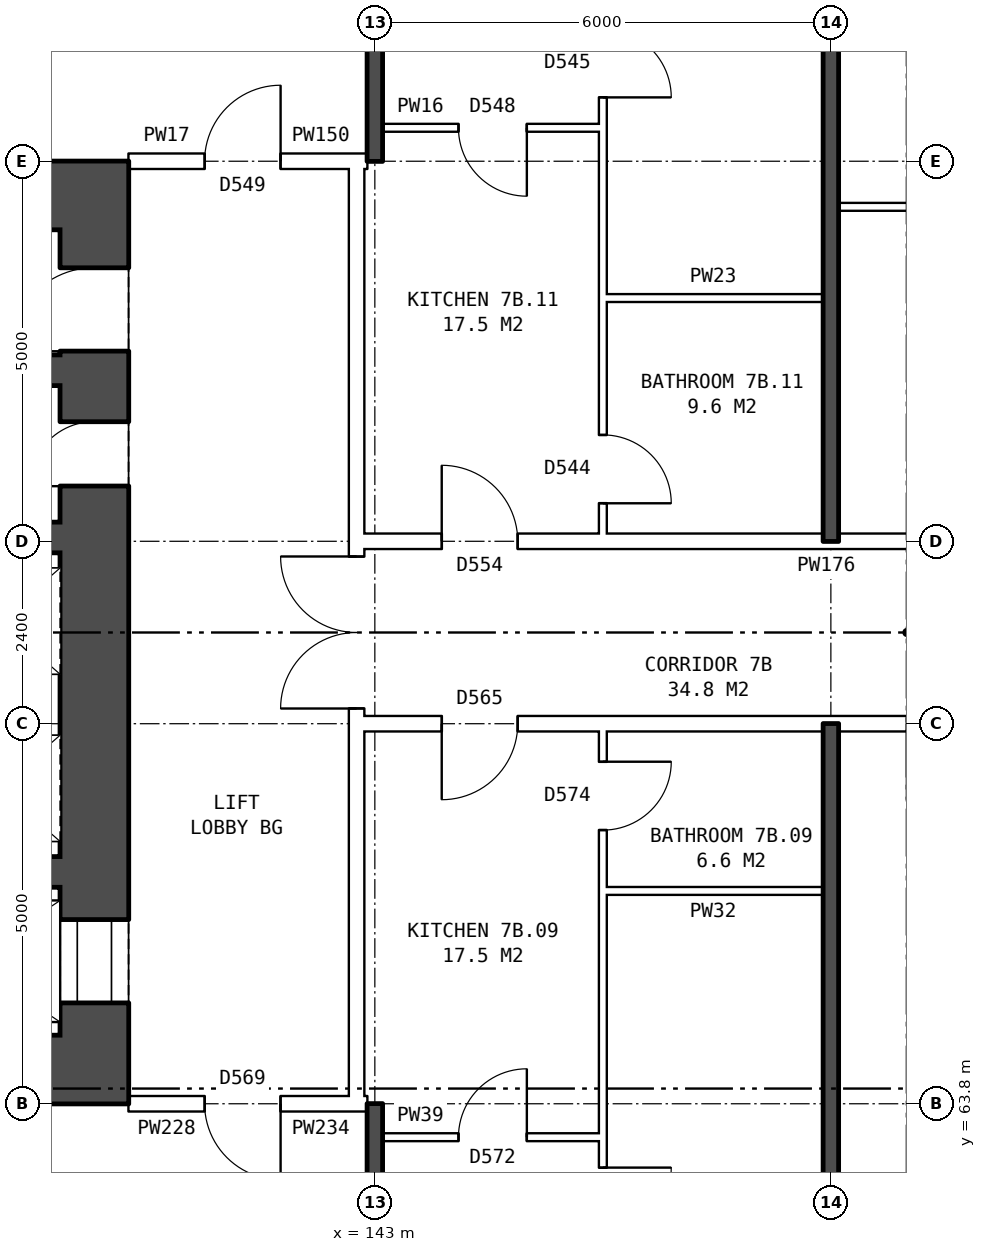
"""IFC4 building model, lengths in metres.
Left out: names, types, materials, properties, quantities, classifications, styles, units other than length and angle.
Written with IfcOpenShell. Run it as: python <this file> out.ifc"""

import sys

from ifc_helpers import new_model, si_unit, direction, frame, frame_2d, origin, place, context, subcontext, project, spatial, rectangle, extrude, element, fill, save


model = new_model("IFC4")
c1 = context("Model", 3, precision=1e-05, world=origin(), true_north=direction((0.0, 1.0)))
c2 = subcontext(c1, "Body", "Model", "MODEL_VIEW")
j1 = project(units=[si_unit("LENGTHUNIT", "METRE"), si_unit("PLANEANGLEUNIT", "RADIAN")], contexts=[c1])
p1 = place(None, origin())
s1 = spatial("IfcSite", under=j1, at=p1, CompositionType="ELEMENT")
p2 = place(p1, origin())
s2 = spatial("IfcBuilding", under=s1, at=p2, CompositionType="ELEMENT")
p3 = place(p2, frame((0.0, 0.0, 28.8)))
s3 = spatial("IfcBuildingStorey", under=s2, at=p3, CompositionType="ELEMENT", Elevation=28.8)
p4 = place(p3, frame((139.31, 64.7, 0.0), z_axis=(0.0, 0.0, 1.0), x_axis=(0.0, 1.0, 0.0)))
e1 = element("IfcWall", 1, at=p4, inside=s3, PredefinedType="SHEAR", context=c2, shape_type="SweptSolid", body=[
    extrude(rectangle(XDim=10.6, YDim=0.9, at=frame_2d((5.3, 0.0))), origin(), (0.0, 0.0, 1.0), 2.85),
])
p5 = place(p4, frame((0.425, 0.0, 0.0)))
e2 = element("IfcOpeningElement", 2, at=p5, cuts=e1, PredefinedType="OPENING", context=c2, shape_type="SweptSolid", body=[
    extrude(rectangle(XDim=1.1, YDim=2.1, at=frame_2d((0.55, 1.05))), frame((0.0, 0.46, 0.0), z_axis=(0.0, -1.0, 0.0), x_axis=(1.0, 0.0, 0.0)), (0.0, 0.0, 1.0), 0.92),
])
p6 = place(p4, frame((9.0, 0.0, 0.0)))
e3 = element("IfcOpeningElement", 3, at=p6, cuts=e1, PredefinedType="OPENING", context=c2, shape_type="SweptSolid", body=[
    extrude(rectangle(XDim=1.1, YDim=2.1, at=frame_2d((0.55, 1.05))), frame((0.0, 0.46, 0.0), z_axis=(0.0, -1.0, 0.0), x_axis=(1.0, 0.0, 0.0)), (0.0, 0.0, 1.0), 0.92),
])
p7 = place(p4, frame((7.225, 0.0, 0.0)))
e4 = element("IfcOpeningElement", 4, at=p7, cuts=e1, PredefinedType="OPENING", context=c2, shape_type="SweptSolid", body=[
    extrude(rectangle(XDim=0.85, YDim=2.1, at=frame_2d((0.425, 1.05))), frame((0.0, 0.46, 0.0), z_axis=(0.0, -1.0, 0.0), x_axis=(1.0, 0.0, 0.0)), (0.0, 0.0, 1.0), 0.92),
])
for number, where, z_axis, x_axis in (
    (5, (139.76, 64.25, 0.0), (0.0, 0.0, 1.0), (-1.0, 0.0, 0.0)),
    (6, (139.76, 75.75, 0.0), (0.0, 0.0, 1.0), (-1.0, 0.0, 0.0)),
):
    element("IfcWall", number, at=place(p3, frame(where, z_axis=z_axis, x_axis=x_axis)), inside=s3, PredefinedType="SHEAR", context=c2, shape_type="SweptSolid", body=[
        extrude(rectangle(XDim=8.4, YDim=0.9, at=frame_2d((4.2, 0.0))), origin(), (0.0, 0.0, 1.0), 2.85),
    ])
p8 = place(p3, frame((138.86, 66.85, 0.0), z_axis=(0.0, 0.0, 1.0), x_axis=(-1.0, 0.0, 0.0)))
e7 = element("IfcWall", 7, at=p8, inside=s3, PredefinedType="SHEAR", context=c2, shape_type="SweptSolid", body=[
    extrude(rectangle(XDim=3.7, YDim=0.4, at=frame_2d((1.85, 0.0))), origin(), (0.0, 0.0, 1.0), 2.85),
])
p9 = place(p3, frame((138.86, 71.25, 0.0), z_axis=(0.0, 0.0, 1.0), x_axis=(-1.0, 0.0, 0.0)))
e8 = element("IfcWall", 8, at=p9, inside=s3, PredefinedType="SHEAR", context=c2, shape_type="SweptSolid", body=[
    extrude(rectangle(XDim=6.6, YDim=0.4, at=frame_2d((3.3, 0.0))), origin(), (0.0, 0.0, 1.0), 2.85),
])
p10 = place(p9, frame((4.25, 0.0, 0.0)))
e9 = element("IfcOpeningElement", 9, at=p10, cuts=e8, PredefinedType="OPENING", context=c2, shape_type="SweptSolid", body=[
    extrude(rectangle(XDim=1.1, YDim=2.1, at=frame_2d((0.55, 1.05))), frame((0.0, 0.21, 0.0), z_axis=(0.0, -1.0, 0.0), x_axis=(1.0, 0.0, 0.0)), (0.0, 0.0, 1.0), 0.42),
])
p11 = place(p9, frame((2.6, 0.0, 0.0)))
e10 = element("IfcOpeningElement", 10, at=p11, cuts=e8, PredefinedType="OPENING", context=c2, shape_type="SweptSolid", body=[
    extrude(rectangle(XDim=0.85, YDim=2.1, at=frame_2d((0.425, 1.05))), frame((0.0, 0.21, 0.0), z_axis=(0.0, -1.0, 0.0), x_axis=(1.0, 0.0, 0.0)), (0.0, 0.0, 1.0), 0.42),
])
p12 = place(p3, frame((138.86, 73.45, 0.0), z_axis=(0.0, 0.0, 1.0), x_axis=(-1.0, 0.0, 0.0)))
e11 = element("IfcWall", 11, at=p12, inside=s3, PredefinedType="SHEAR", context=c2, shape_type="SweptSolid", body=[
    extrude(rectangle(XDim=1.95, YDim=0.4, at=frame_2d((0.975, 0.0))), origin(), (0.0, 0.0, 1.0), 2.85),
])
p13 = place(p3, frame((142.76, 63.9, 0.0), z_axis=(0.0, 0.0, 1.0), x_axis=(0.0, 1.0, 0.0)))
e12 = element("IfcWall", 12, at=p13, inside=s3, PredefinedType="PARTITIONING", context=c2, shape_type="SweptSolid", body=[
    extrude(rectangle(XDim=12.2, YDim=0.2, at=frame_2d((6.1, 0.0))), origin(), (0.0, 0.0, 1.0), 2.85),
])
p14 = place(p13, frame((5.1, 0.0, 0.0)))
e13 = element("IfcOpeningElement", 13, at=p14, cuts=e12, PredefinedType="OPENING", context=c2, shape_type="SweptSolid", body=[
    extrude(rectangle(XDim=2.0, YDim=2.1, at=frame_2d((1.0, 1.05))), frame((0.0, 0.11, 0.0), z_axis=(0.0, -1.0, 0.0), x_axis=(1.0, 0.0, 0.0)), (0.0, 0.0, 1.0), 0.22),
])
p15 = place(p3, frame((143.1, 63.36, 0.0), z_axis=(0.0, 0.0, 1.0), x_axis=(1.0, 0.0, 0.0)))
e14 = element("IfcWall", 14, at=p15, inside=s3, PredefinedType="PARTITIONING", context=c2, shape_type="SweptSolid", body=[
    extrude(rectangle(XDim=2.9, YDim=0.1, at=frame_2d((1.45, 0.0))), origin(), (0.0, 0.0, 1.0), 2.85),
])
p16 = place(p15, frame((1.0, 0.0, 0.0)))
e15 = element("IfcOpeningElement", 15, at=p16, cuts=e14, PredefinedType="OPENING", context=c2, shape_type="SweptSolid", body=[
    extrude(rectangle(XDim=0.9, YDim=2.1, at=frame_2d((0.45, 1.05))), frame((0.0, 0.06, 0.0), z_axis=(0.0, -1.0, 0.0), x_axis=(1.0, 0.0, 0.0)), (0.0, 0.0, 1.0), 0.12),
])
p17 = place(p3, frame((139.76, 63.8, 0.0), z_axis=(0.0, 0.0, 1.0), x_axis=(1.0, 0.0, 0.0)))
e16 = element("IfcWall", 16, at=p17, inside=s3, PredefinedType="PARTITIONING", context=c2, shape_type="SweptSolid", body=[
    extrude(rectangle(XDim=3.0, YDim=0.2, at=frame_2d((1.5, 0.0))), origin(), (0.0, 0.0, 1.0), 2.85),
])
p18 = place(p17, frame((1.0, 0.0, 0.0)))
e17 = element("IfcOpeningElement", 17, at=p18, cuts=e16, PredefinedType="OPENING", context=c2, shape_type="SweptSolid", body=[
    extrude(rectangle(XDim=1.0, YDim=2.1, at=frame_2d((0.5, 1.05))), frame((0.0, 0.11, 0.0), z_axis=(0.0, -1.0, 0.0), x_axis=(1.0, 0.0, 0.0)), (0.0, 0.0, 1.0), 0.22),
])
p19 = place(p3, frame((142.76, 63.8, 0.0), z_axis=(0.0, 0.0, 1.0), x_axis=(1.0, 0.0, 0.0)))
e18 = element("IfcWall", 18, at=p19, inside=s3, PredefinedType="PARTITIONING", context=c2, shape_type="SweptSolid", body=[
    extrude(rectangle(XDim=0.14, YDim=0.2, at=frame_2d((0.07, 0.0))), origin(), (0.0, 0.0, 1.0), 2.85),
])
p20 = place(p3, frame((146.0, 66.6, 0.0), z_axis=(0.0, 0.0, 1.0), x_axis=(1.0, 0.0, 0.0)))
e19 = element("IfcWall", 19, at=p20, inside=s3, PredefinedType="PARTITIONING", context=c2, shape_type="SweptSolid", body=[
    extrude(rectangle(XDim=2.9, YDim=0.1, at=frame_2d((1.45, 0.0))), origin(), (0.0, 0.0, 1.0), 2.85),
])
p21 = place(p3, frame((142.76, 68.8, 0.0), z_axis=(0.0, 0.0, 1.0), x_axis=(1.0, 0.0, 0.0)))
e20 = element("IfcWall", 20, at=p21, inside=s3, PredefinedType="PARTITIONING", context=c2, shape_type="SweptSolid", body=[
    extrude(rectangle(XDim=14.48, YDim=0.2, at=frame_2d((7.24, 0.0))), origin(), (0.0, 0.0, 1.0), 2.85),
])
p22 = place(p21, frame((1.12, 0.0, 0.0)))
e21 = element("IfcOpeningElement", 21, at=p22, cuts=e20, PredefinedType="OPENING", context=c2, shape_type="SweptSolid", body=[
    extrude(rectangle(XDim=1.0, YDim=2.1, at=frame_2d((0.5, 1.05))), frame((0.0, 0.11, 0.0), z_axis=(0.0, -1.0, 0.0), x_axis=(1.0, 0.0, 0.0)), (0.0, 0.0, 1.0), 0.22),
])
p23 = place(p21, frame((7.24, 0.0, 0.0)))
e22 = element("IfcOpeningElement", 22, at=p23, cuts=e20, PredefinedType="OPENING", context=c2, shape_type="SweptSolid", body=[
    extrude(rectangle(XDim=1.0, YDim=2.1, at=frame_2d((0.5, 1.05))), frame((0.0, 0.11, 0.0), z_axis=(0.0, -1.0, 0.0), x_axis=(1.0, 0.0, 0.0)), (0.0, 0.0, 1.0), 0.22),
])
p24 = place(p3, frame((142.76, 71.2, 0.0), z_axis=(0.0, 0.0, 1.0), x_axis=(1.0, 0.0, 0.0)))
e23 = element("IfcWall", 23, at=p24, inside=s3, PredefinedType="PARTITIONING", context=c2, shape_type="SweptSolid", body=[
    extrude(rectangle(XDim=14.48, YDim=0.2, at=frame_2d((7.24, 0.0))), origin(), (0.0, 0.0, 1.0), 2.85),
])
p25 = place(p24, frame((1.12, 0.0, 0.0)))
e24 = element("IfcOpeningElement", 24, at=p25, cuts=e23, PredefinedType="OPENING", context=c2, shape_type="SweptSolid", body=[
    extrude(rectangle(XDim=1.0, YDim=2.1, at=frame_2d((0.5, 1.05))), frame((0.0, 0.11, 0.0), z_axis=(0.0, -1.0, 0.0), x_axis=(1.0, 0.0, 0.0)), (0.0, 0.0, 1.0), 0.22),
])
p26 = place(p24, frame((10.24, 0.0, 0.0)))
e25 = element("IfcOpeningElement", 25, at=p26, cuts=e23, PredefinedType="OPENING", context=c2, shape_type="SweptSolid", body=[
    extrude(rectangle(XDim=1.0, YDim=2.1, at=frame_2d((0.5, 1.05))), frame((0.0, 0.11, 0.0), z_axis=(0.0, -1.0, 0.0), x_axis=(1.0, 0.0, 0.0)), (0.0, 0.0, 1.0), 0.22),
])
for number, where, z_axis, x_axis in (
    (26, (146.0, 74.4, 0.0), (0.0, 0.0, 1.0), (1.0, 0.0, 0.0)),
    (27, (149.1, 75.6, 0.0), (0.0, 0.0, 1.0), (1.0, 0.0, 0.0)),
):
    element("IfcWall", number, at=place(p3, frame(where, z_axis=z_axis, x_axis=x_axis)), inside=s3, PredefinedType="PARTITIONING", context=c2, shape_type="SweptSolid", body=[
        extrude(rectangle(XDim=2.9, YDim=0.1, at=frame_2d((1.45, 0.0))), origin(), (0.0, 0.0, 1.0), 2.85),
    ])
p27 = place(p3, frame((139.76, 76.2, 0.0), z_axis=(0.0, 0.0, 1.0), x_axis=(1.0, 0.0, 0.0)))
e28 = element("IfcWall", 28, at=p27, inside=s3, PredefinedType="PARTITIONING", context=c2, shape_type="SweptSolid", body=[
    extrude(rectangle(XDim=3.0, YDim=0.2, at=frame_2d((1.5, 0.0))), origin(), (0.0, 0.0, 1.0), 2.85),
])
p28 = place(p27, frame((1.0, 0.0, 0.0)))
e29 = element("IfcOpeningElement", 29, at=p28, cuts=e28, PredefinedType="OPENING", context=c2, shape_type="SweptSolid", body=[
    extrude(rectangle(XDim=1.0, YDim=2.1, at=frame_2d((0.5, 1.05))), frame((0.0, 0.11, 0.0), z_axis=(0.0, -1.0, 0.0), x_axis=(1.0, 0.0, 0.0)), (0.0, 0.0, 1.0), 0.22),
])
p29 = place(p3, frame((142.76, 76.2, 0.0), z_axis=(0.0, 0.0, 1.0), x_axis=(1.0, 0.0, 0.0)))
e30 = element("IfcWall", 30, at=p29, inside=s3, PredefinedType="PARTITIONING", context=c2, shape_type="SweptSolid", body=[
    extrude(rectangle(XDim=0.14, YDim=0.2, at=frame_2d((0.07, 0.0))), origin(), (0.0, 0.0, 1.0), 2.85),
])
p30 = place(p3, frame((143.1, 76.64, 0.0), z_axis=(0.0, 0.0, 1.0), x_axis=(1.0, 0.0, 0.0)))
e31 = element("IfcWall", 31, at=p30, inside=s3, PredefinedType="PARTITIONING", context=c2, shape_type="SweptSolid", body=[
    extrude(rectangle(XDim=2.9, YDim=0.1, at=frame_2d((1.45, 0.0))), origin(), (0.0, 0.0, 1.0), 2.85),
])
p31 = place(p30, frame((1.0, 0.0, 0.0)))
e32 = element("IfcOpeningElement", 32, at=p31, cuts=e31, PredefinedType="OPENING", context=c2, shape_type="SweptSolid", body=[
    extrude(rectangle(XDim=0.9, YDim=2.1, at=frame_2d((0.45, 1.05))), frame((0.0, 0.06, 0.0), z_axis=(0.0, -1.0, 0.0), x_axis=(1.0, 0.0, 0.0)), (0.0, 0.0, 1.0), 0.12),
])
for number, where, z_axis, x_axis in (
    (33, (143.0, 54.36, 0.0), (0.0, 0.0, 1.0), (0.0, 1.0, 0.0)),
    (34, (143.0, 76.2, 0.0), (0.0, 0.0, 1.0), (0.0, 1.0, 0.0)),
):
    element("IfcWall", number, at=place(p3, frame(where, z_axis=z_axis, x_axis=x_axis)), inside=s3, PredefinedType="SOLIDWALL", context=c2, shape_type="SweptSolid", body=[
        extrude(rectangle(XDim=9.44, YDim=0.2, at=frame_2d((4.72, 0.0))), origin(), (0.0, 0.0, 1.0), 2.85),
    ])
p32 = place(p3, frame((146.0, 54.36, 0.0), z_axis=(0.0, 0.0, 1.0), x_axis=(0.0, 1.0, 0.0)))
e35 = element("IfcWall", 35, at=p32, inside=s3, PredefinedType="PARTITIONING", context=c2, shape_type="SweptSolid", body=[
    extrude(rectangle(XDim=14.34, YDim=0.1, at=frame_2d((7.17, 0.0))), origin(), (0.0, 0.0, 1.0), 2.85),
])
p33 = place(p32, frame((7.7, 0.0, 0.0)))
e36 = element("IfcOpeningElement", 36, at=p33, cuts=e35, PredefinedType="OPENING", context=c2, shape_type="SweptSolid", body=[
    extrude(rectangle(XDim=0.9, YDim=2.1, at=frame_2d((0.45, 1.05))), frame((0.0, 0.06, 0.0), z_axis=(0.0, -1.0, 0.0), x_axis=(1.0, 0.0, 0.0)), (0.0, 0.0, 1.0), 0.12),
])
p34 = place(p32, frame((13.04, 0.0, 0.0)))
e37 = element("IfcOpeningElement", 37, at=p34, cuts=e35, PredefinedType="OPENING", context=c2, shape_type="SweptSolid", body=[
    extrude(rectangle(XDim=0.9, YDim=2.1, at=frame_2d((0.45, 1.05))), frame((0.0, 0.06, 0.0), z_axis=(0.0, -1.0, 0.0), x_axis=(1.0, 0.0, 0.0)), (0.0, 0.0, 1.0), 0.12),
])
p35 = place(p3, frame((146.0, 71.3, 0.0), z_axis=(0.0, 0.0, 1.0), x_axis=(0.0, 1.0, 0.0)))
e38 = element("IfcWall", 38, at=p35, inside=s3, PredefinedType="PARTITIONING", context=c2, shape_type="SweptSolid", body=[
    extrude(rectangle(XDim=14.34, YDim=0.1, at=frame_2d((7.17, 0.0))), origin(), (0.0, 0.0, 1.0), 2.85),
])
p36 = place(p35, frame((5.74, 0.0, 0.0)))
e39 = element("IfcOpeningElement", 39, at=p36, cuts=e38, PredefinedType="OPENING", context=c2, shape_type="SweptSolid", body=[
    extrude(rectangle(XDim=0.9, YDim=2.1, at=frame_2d((0.45, 1.05))), frame((0.0, 0.06, 0.0), z_axis=(0.0, -1.0, 0.0), x_axis=(1.0, 0.0, 0.0)), (0.0, 0.0, 1.0), 0.12),
])
p37 = place(p35, frame((0.4, 0.0, 0.0)))
e40 = element("IfcOpeningElement", 40, at=p37, cuts=e38, PredefinedType="OPENING", context=c2, shape_type="SweptSolid", body=[
    extrude(rectangle(XDim=0.9, YDim=2.1, at=frame_2d((0.45, 1.05))), frame((0.0, 0.06, 0.0), z_axis=(0.0, -1.0, 0.0), x_axis=(1.0, 0.0, 0.0)), (0.0, 0.0, 1.0), 0.12),
])
for number, where, z_axis, x_axis in (
    (41, (149.0, 54.36, 0.0), (0.0, 0.0, 1.0), (0.0, 1.0, 0.0)),
    (42, (149.0, 71.2, 0.0), (0.0, 0.0, 1.0), (0.0, 1.0, 0.0)),
):
    element("IfcWall", number, at=place(p3, frame(where, z_axis=z_axis, x_axis=x_axis)), inside=s3, PredefinedType="SOLIDWALL", context=c2, shape_type="SweptSolid", body=[
        extrude(rectangle(XDim=14.44, YDim=0.2, at=frame_2d((7.22, 0.0))), origin(), (0.0, 0.0, 1.0), 2.85),
    ])
p38 = place(p5, origin())
e43 = element("IfcDoor", 43, at=p38, inside=s3, OperationType="DOUBLE_DOOR_SLIDING", PredefinedType="DOOR", context=c2, shape_type="SweptSolid", body=[
    extrude(rectangle(XDim=1.1, YDim=2.1, at=frame_2d((0.55, 1.05))), frame((0.0, 0.435, 0.0), z_axis=(0.0, -1.0, 0.0), x_axis=(1.0, 0.0, 0.0)), (0.0, 0.0, 1.0), 0.05),
])
fill(e2, e43)
p39 = place(p6, origin())
e44 = element("IfcDoor", 44, at=p39, inside=s3, OperationType="SINGLE_SWING_LEFT", PredefinedType="DOOR", context=c2, shape_type="SweptSolid", body=[
    extrude(rectangle(XDim=1.1, YDim=2.1, at=frame_2d((0.55, 1.05))), frame((0.0, 0.435, 0.0), z_axis=(0.0, -1.0, 0.0), x_axis=(1.0, 0.0, 0.0)), (0.0, 0.0, 1.0), 0.05),
])
fill(e3, e44)
p40 = place(p7, origin())
e45 = element("IfcDoor", 45, at=p40, inside=s3, OperationType="SINGLE_SWING_LEFT", PredefinedType="DOOR", context=c2, shape_type="SweptSolid", body=[
    extrude(rectangle(XDim=0.85, YDim=2.1, at=frame_2d((0.425, 1.05))), frame((0.0, 0.435, 0.0), z_axis=(0.0, -1.0, 0.0), x_axis=(1.0, 0.0, 0.0)), (0.0, 0.0, 1.0), 0.05),
])
fill(e4, e45)
p41 = place(p14, origin())
e46 = element("IfcDoor", 46, at=p41, inside=s3, OperationType="DOUBLE_DOOR_SINGLE_SWING", PredefinedType="DOOR", context=c2, shape_type="SweptSolid", body=[
    extrude(rectangle(XDim=2.0, YDim=2.1, at=frame_2d((1.0, 1.05))), frame((0.0, 0.025, 0.0), z_axis=(0.0, -1.0, 0.0), x_axis=(1.0, 0.0, 0.0)), (0.0, 0.0, 1.0), 0.05),
])
fill(e13, e46)
p42 = place(p18, frame((1.0, 0.0, 0.0), z_axis=(0.0, 0.0, 1.0), x_axis=(-1.0, 0.0, 0.0)))
e47 = element("IfcDoor", 47, at=p42, inside=s3, OperationType="SINGLE_SWING_LEFT", PredefinedType="DOOR", context=c2, shape_type="SweptSolid", body=[
    extrude(rectangle(XDim=1.0, YDim=2.1, at=frame_2d((0.5, 1.05))), frame((0.0, 0.025, 0.0), z_axis=(0.0, -1.0, 0.0), x_axis=(1.0, 0.0, 0.0)), (0.0, 0.0, 1.0), 0.05),
])
fill(e17, e47)
p43 = place(p28, origin())
e48 = element("IfcDoor", 48, at=p43, inside=s3, OperationType="SINGLE_SWING_RIGHT", PredefinedType="DOOR", context=c2, shape_type="SweptSolid", body=[
    extrude(rectangle(XDim=1.0, YDim=2.1, at=frame_2d((0.5, 1.05))), frame((0.0, 0.025, 0.0), z_axis=(0.0, -1.0, 0.0), x_axis=(1.0, 0.0, 0.0)), (0.0, 0.0, 1.0), 0.05),
])
fill(e29, e48)
p44 = place(p33, frame((0.9, 0.0, 0.0), z_axis=(0.0, 0.0, 1.0), x_axis=(-1.0, 0.0, 0.0)))
e49 = element("IfcDoor", 49, at=p44, inside=s3, OperationType="SINGLE_SWING_LEFT", PredefinedType="DOOR", context=c2, shape_type="SweptSolid", body=[
    extrude(rectangle(XDim=0.9, YDim=2.1, at=frame_2d((0.45, 1.05))), frame((0.0, 0.025, 0.0), z_axis=(0.0, -1.0, 0.0), x_axis=(1.0, 0.0, 0.0)), (0.0, 0.0, 1.0), 0.05),
])
fill(e36, e49)
p45 = place(p22, frame((1.0, 0.0, 0.0), z_axis=(0.0, 0.0, 1.0), x_axis=(-1.0, 0.0, 0.0)))
e50 = element("IfcDoor", 50, at=p45, inside=s3, OperationType="SINGLE_SWING_RIGHT", PredefinedType="DOOR", context=c2, shape_type="SweptSolid", body=[
    extrude(rectangle(XDim=1.0, YDim=2.1, at=frame_2d((0.5, 1.05))), frame((0.0, 0.025, 0.0), z_axis=(0.0, -1.0, 0.0), x_axis=(1.0, 0.0, 0.0)), (0.0, 0.0, 1.0), 0.05),
])
fill(e21, e50)
p46 = place(p16, origin())
e51 = element("IfcDoor", 51, at=p46, inside=s3, OperationType="SINGLE_SWING_RIGHT", PredefinedType="DOOR", context=c2, shape_type="SweptSolid", body=[
    extrude(rectangle(XDim=0.9, YDim=2.1, at=frame_2d((0.45, 1.05))), frame((0.0, 0.025, 0.0), z_axis=(0.0, -1.0, 0.0), x_axis=(1.0, 0.0, 0.0)), (0.0, 0.0, 1.0), 0.05),
])
fill(e15, e51)
p47 = place(p34, frame((0.9, 0.0, 0.0), z_axis=(0.0, 0.0, 1.0), x_axis=(-1.0, 0.0, 0.0)))
e52 = element("IfcDoor", 52, at=p47, inside=s3, OperationType="SINGLE_SWING_LEFT", PredefinedType="DOOR", context=c2, shape_type="SweptSolid", body=[
    extrude(rectangle(XDim=0.9, YDim=2.1, at=frame_2d((0.45, 1.05))), frame((0.0, 0.025, 0.0), z_axis=(0.0, -1.0, 0.0), x_axis=(1.0, 0.0, 0.0)), (0.0, 0.0, 1.0), 0.05),
])
fill(e37, e52)
p48 = place(p36, frame((0.9, 0.0, 0.0), z_axis=(0.0, 0.0, 1.0), x_axis=(-1.0, 0.0, 0.0)))
e53 = element("IfcDoor", 53, at=p48, inside=s3, OperationType="SINGLE_SWING_RIGHT", PredefinedType="DOOR", context=c2, shape_type="SweptSolid", body=[
    extrude(rectangle(XDim=0.9, YDim=2.1, at=frame_2d((0.45, 1.05))), frame((0.0, 0.025, 0.0), z_axis=(0.0, -1.0, 0.0), x_axis=(1.0, 0.0, 0.0)), (0.0, 0.0, 1.0), 0.05),
])
fill(e39, e53)
p49 = place(p25, origin())
e54 = element("IfcDoor", 54, at=p49, inside=s3, OperationType="SINGLE_SWING_LEFT", PredefinedType="DOOR", context=c2, shape_type="SweptSolid", body=[
    extrude(rectangle(XDim=1.0, YDim=2.1, at=frame_2d((0.5, 1.05))), frame((0.0, 0.025, 0.0), z_axis=(0.0, -1.0, 0.0), x_axis=(1.0, 0.0, 0.0)), (0.0, 0.0, 1.0), 0.05),
])
fill(e24, e54)
p50 = place(p31, frame((0.9, 0.0, 0.0), z_axis=(0.0, 0.0, 1.0), x_axis=(-1.0, 0.0, 0.0)))
e55 = element("IfcDoor", 55, at=p50, inside=s3, OperationType="SINGLE_SWING_LEFT", PredefinedType="DOOR", context=c2, shape_type="SweptSolid", body=[
    extrude(rectangle(XDim=0.9, YDim=2.1, at=frame_2d((0.45, 1.05))), frame((0.0, 0.025, 0.0), z_axis=(0.0, -1.0, 0.0), x_axis=(1.0, 0.0, 0.0)), (0.0, 0.0, 1.0), 0.05),
])
fill(e32, e55)
p51 = place(p37, frame((0.9, 0.0, 0.0), z_axis=(0.0, 0.0, 1.0), x_axis=(-1.0, 0.0, 0.0)))
e56 = element("IfcDoor", 56, at=p51, inside=s3, OperationType="SINGLE_SWING_RIGHT", PredefinedType="DOOR", context=c2, shape_type="SweptSolid", body=[
    extrude(rectangle(XDim=0.9, YDim=2.1, at=frame_2d((0.45, 1.05))), frame((0.0, 0.025, 0.0), z_axis=(0.0, -1.0, 0.0), x_axis=(1.0, 0.0, 0.0)), (0.0, 0.0, 1.0), 0.05),
])
fill(e40, e56)
save(model, sys.argv[1])
